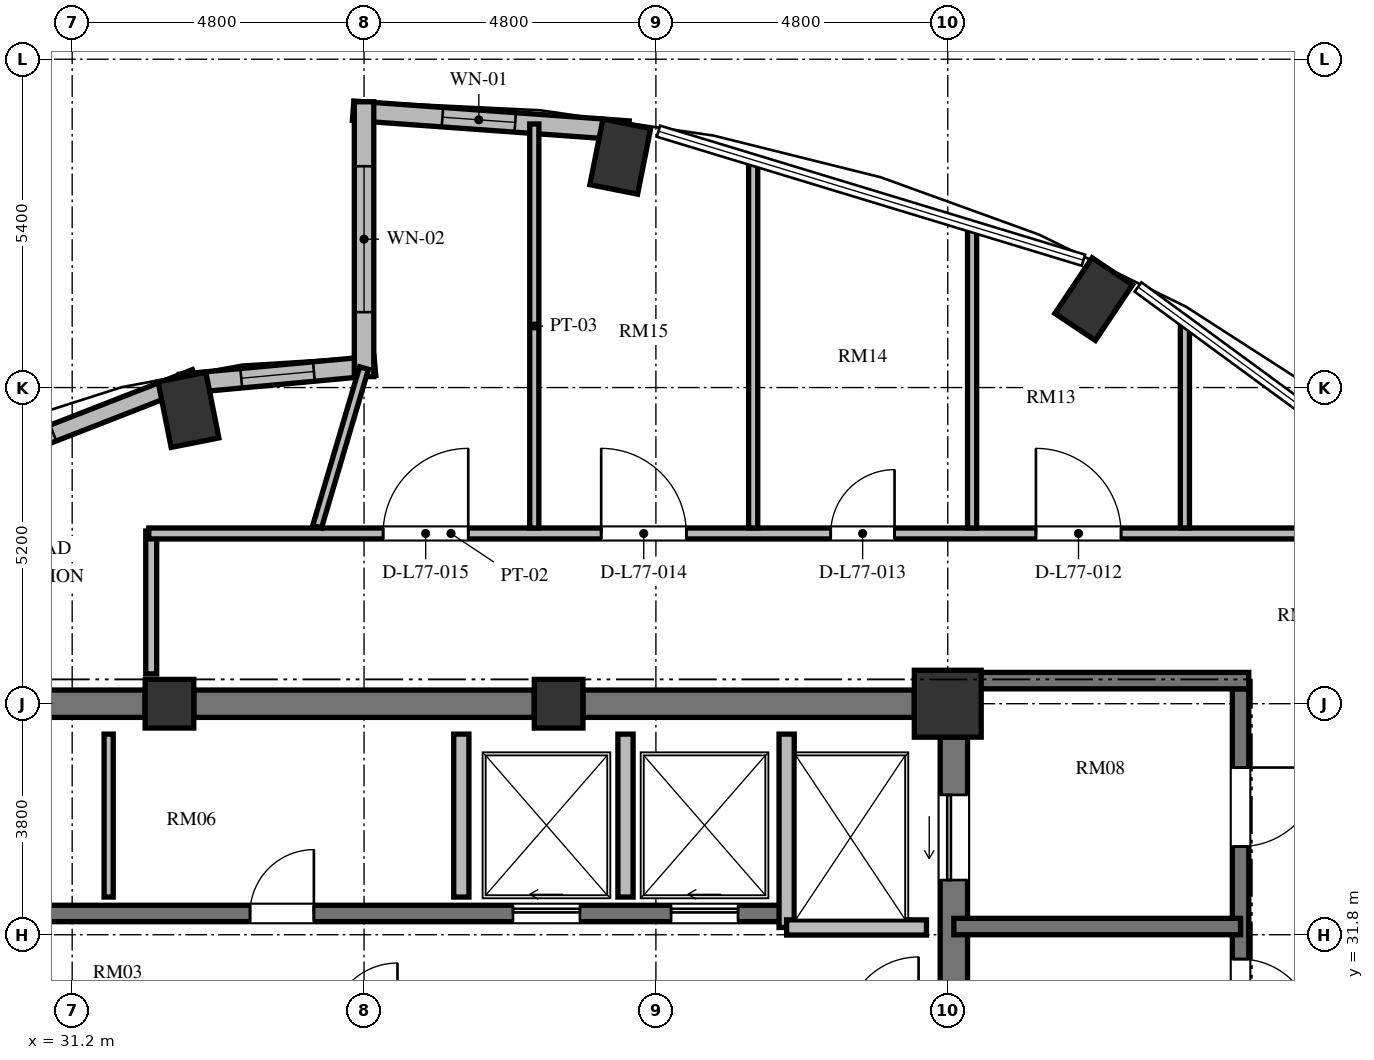
"""IFC4 building model, lengths in metres.
Left out: names, types, materials, properties, quantities, classifications, styles, units other than length and angle.
Written with IfcOpenShell. Run it as: python <this file> out.ifc"""

import sys

from ifc_helpers import new_model, si_unit, direction, frame, frame_2d, origin, origin_2d, place, context, subcontext, project, spatial, rectangle, extrude, element, fill, save


model = new_model("IFC4")
c1 = context("Model", 3, precision=1e-05, world=origin(), true_north=direction((0.0, 1.0)))
c2 = subcontext(c1, "Body", "Model", "MODEL_VIEW")
j1 = project(units=[si_unit("LENGTHUNIT", "METRE"), si_unit("PLANEANGLEUNIT", "RADIAN")], contexts=[c1])
p1 = place(None, origin())
s1 = spatial("IfcSite", under=j1, at=p1, CompositionType="ELEMENT")
p2 = place(p1, origin())
s2 = spatial("IfcBuilding", under=s1, at=p2, CompositionType="ELEMENT")
p3 = place(p2, frame((0.0, 0.0, 295.152)))
s3 = spatial("IfcBuildingStorey", under=s2, at=p3, CompositionType="ELEMENT", Elevation=295.152)
for number, where, z_axis, x_axis in (
    (1, (48.0, 42.254, 0.0), (0.0, 0.0, 1.0), (0.556, 0.831, 0.0)),
    (2, (40.214, 44.598, 0.0), (0.0, 0.0, 1.0), (0.195, 0.981, 0.0)),
    (3, (33.113, 40.433, 0.0), (0.0, 0.0, 1.0), (-0.195, 0.981, 0.0)),
):
    element("IfcColumn", number, at=place(p3, frame(where, z_axis=z_axis, x_axis=x_axis)), inside=s3, PredefinedType="COLUMN", context=c2, shape_type="SweptSolid", body=[
        extrude(rectangle(XDim=1.1, YDim=0.8, at=origin_2d()), origin(), (0.0, 0.0, 1.0), 3.648),
    ])
p4 = place(p3, frame((45.6, 35.6, 0.0), z_axis=(0.0, 0.0, 1.0), x_axis=(1.0, 0.0, 0.0)))
e4 = element("IfcColumn", 4, at=p4, inside=s3, PredefinedType="COLUMN", context=c2, shape_type="SweptSolid", body=[
    extrude(rectangle(XDim=1.1, YDim=1.1, at=origin_2d()), origin(), (0.0, 0.0, 1.0), 3.648),
])
for number, where, z_axis, x_axis in (
    (5, (39.2, 35.6, 0.0), (0.0, 0.0, 1.0), (1.0, 0.0, 0.0)),
    (6, (32.8, 35.6, 0.0), (0.0, 0.0, 1.0), (1.0, 0.0, 0.0)),
):
    element("IfcColumn", number, at=place(p3, frame(where, z_axis=z_axis, x_axis=x_axis)), inside=s3, PredefinedType="COLUMN", context=c2, shape_type="SweptSolid", body=[
        extrude(rectangle(XDim=0.8, YDim=0.8, at=origin_2d()), origin(), (0.0, 0.0, 1.0), 3.648),
    ])
p5 = place(p3, frame((45.7, 20.95, 0.0), z_axis=(0.0, 0.0, 1.0), x_axis=(0.0, 1.0, 0.0)))
e7 = element("IfcWall", 7, at=p5, inside=s3, PredefinedType="SHEAR", context=c2, shape_type="SweptSolid", body=[
    extrude(rectangle(XDim=14.1, YDim=0.45, at=frame_2d((7.05, 0.0))), origin(), (0.0, 0.0, 1.0), 3.648),
])
p6 = place(p5, frame((11.75, 0.0, 0.0)))
e8 = element("IfcOpeningElement", 8, at=p6, cuts=e7, PredefinedType="OPENING", context=c2, shape_type="SweptSolid", body=[
    extrude(rectangle(XDim=1.4, YDim=2.3, at=frame_2d((0.7, 1.15))), frame((0.0, 0.235, 0.0), z_axis=(0.0, -1.0, 0.0), x_axis=(1.0, 0.0, 0.0)), (0.0, 0.0, 1.0), 0.47),
])
p7 = place(p5, frame((0.95, 0.0, 0.0)))
e9 = element("IfcOpeningElement", 9, at=p7, cuts=e7, PredefinedType="OPENING", context=c2, shape_type="SweptSolid", body=[
    extrude(rectangle(XDim=1.4, YDim=2.3, at=frame_2d((0.7, 1.15))), frame((0.0, 0.235, 0.0), z_axis=(0.0, -1.0, 0.0), x_axis=(1.0, 0.0, 0.0)), (0.0, 0.0, 1.0), 0.47),
])
p8 = place(p3, frame((26.95, 35.6, 0.0), z_axis=(0.0, 0.0, 1.0), x_axis=(1.0, 0.0, 0.0)))
e10 = element("IfcWall", 10, at=p8, inside=s3, PredefinedType="SHEAR", context=c2, shape_type="SweptSolid", body=[
    extrude(rectangle(XDim=5.45, YDim=0.45, at=frame_2d((2.725, 0.0))), origin(), (0.0, 0.0, 1.0), 3.648),
])
p9 = place(p3, frame((33.2, 35.6, 0.0), z_axis=(0.0, 0.0, 1.0), x_axis=(1.0, 0.0, 0.0)))
e11 = element("IfcWall", 11, at=p9, inside=s3, PredefinedType="SHEAR", context=c2, shape_type="SweptSolid", body=[
    extrude(rectangle(XDim=5.6, YDim=0.45, at=frame_2d((2.8, 0.0))), origin(), (0.0, 0.0, 1.0), 3.648),
])
p10 = place(p3, frame((39.6, 35.6, 0.0), z_axis=(0.0, 0.0, 1.0), x_axis=(1.0, 0.0, 0.0)))
e12 = element("IfcWall", 12, at=p10, inside=s3, PredefinedType="SHEAR", context=c2, shape_type="SweptSolid", body=[
    extrude(rectangle(XDim=5.45, YDim=0.45, at=frame_2d((2.725, 0.0))), origin(), (0.0, 0.0, 1.0), 3.648),
])
p11 = place(p3, frame((33.228, 40.964, 0.0), z_axis=(0.0, 0.0, 1.0), x_axis=(-0.931716550814, -0.36318627306, 0.0)))
e13 = element("IfcWall", 13, at=p11, inside=s3, PredefinedType="SOLIDWALL", context=c2, shape_type="SweptSolid", body=[
    extrude(rectangle(XDim=6.224, YDim=0.28, at=frame_2d((3.112, 0.0))), origin(), (0.0, 0.0, 1.0), 3.448),
])
p12 = place(p11, frame((2.512, 0.0, 0.85)))
e14 = element("IfcOpeningElement", 14, at=p12, cuts=e13, PredefinedType="OPENING", context=c2, shape_type="SweptSolid", body=[
    extrude(rectangle(XDim=1.2, YDim=1.8, at=frame_2d((0.6, 0.9))), frame((0.0, 0.15, 0.0), z_axis=(0.0, -1.0, 0.0), x_axis=(1.0, 0.0, 0.0)), (0.0, 0.0, 1.0), 0.3),
])
p13 = place(p3, frame((40.35, 45.026, 0.0), z_axis=(0.0, 0.0, 1.0), x_axis=(-0.997412917451, 0.071885131294, 0.0)))
e15 = element("IfcWall", 15, at=p13, inside=s3, PredefinedType="SOLIDWALL", context=c2, shape_type="SweptSolid", body=[
    extrude(rectangle(XDim=4.541, YDim=0.32, at=frame_2d((2.271, 0.0))), origin(), (0.0, 0.0, 1.0), 3.448),
])
p14 = place(p13, frame((1.868, 0.0, 0.85)))
e16 = element("IfcOpeningElement", 16, at=p14, cuts=e15, PredefinedType="OPENING", context=c2, shape_type="SweptSolid", body=[
    extrude(rectangle(XDim=1.2, YDim=2.2, at=frame_2d((0.6, 1.1))), frame((0.0, 0.17, 0.0), z_axis=(0.0, -1.0, 0.0), x_axis=(1.0, 0.0, 0.0)), (0.0, 0.0, 1.0), 0.34),
])
p15 = place(p3, frame((36.179, 41.156, 0.0), z_axis=(0.0, 0.0, 1.0), x_axis=(-0.995736155144, -0.092247001792, 0.0)))
e17 = element("IfcWall", 17, at=p15, inside=s3, PredefinedType="SOLIDWALL", context=c2, shape_type="SweptSolid", body=[
    extrude(rectangle(XDim=3.216, YDim=0.32, at=frame_2d((1.608, 0.0))), origin(), (0.0, 0.0, 1.0), 3.448),
])
p16 = place(p15, frame((1.008, 0.0, 0.85)))
e18 = element("IfcOpeningElement", 18, at=p16, cuts=e17, PredefinedType="OPENING", context=c2, shape_type="SweptSolid", body=[
    extrude(rectangle(XDim=1.2, YDim=1.8, at=frame_2d((0.6, 0.9))), frame((0.0, 0.17, 0.0), z_axis=(0.0, -1.0, 0.0), x_axis=(1.0, 0.0, 0.0)), (0.0, 0.0, 1.0), 0.34),
])
p17 = place(p3, frame((36.0, 45.5, 0.0), z_axis=(0.0, 0.0, 1.0), x_axis=(0.0, -1.0, 0.0)))
e19 = element("IfcWall", 19, at=p17, inside=s3, PredefinedType="SOLIDWALL", context=c2, shape_type="SweptSolid", body=[
    extrude(rectangle(XDim=4.52, YDim=0.32, at=frame_2d((2.26, 0.0))), origin(), (0.0, 0.0, 1.0), 3.448),
])
p18 = place(p17, frame((1.06, 0.0, 0.84)))
e20 = element("IfcOpeningElement", 20, at=p18, cuts=e19, PredefinedType="OPENING", context=c2, shape_type="SweptSolid", body=[
    extrude(rectangle(XDim=2.4, YDim=2.04, at=frame_2d((1.2, 1.02))), frame((0.0, 0.17, 0.0), z_axis=(0.0, -1.0, 0.0), x_axis=(1.0, 0.0, 0.0)), (0.0, 0.0, 1.0), 0.34),
])
p19 = place(p3, frame((26.55, 32.15, 0.0), z_axis=(0.0, 0.0, 1.0), x_axis=(1.0, 0.0, 0.0)))
e21 = element("IfcWall", 21, at=p19, inside=s3, PredefinedType="SHEAR", context=c2, shape_type="SweptSolid", body=[
    extrude(rectangle(XDim=16.4, YDim=0.27, at=frame_2d((8.2, 0.0))), origin(), (0.0, 0.0, 1.0), 3.648),
])
p20 = place(p19, frame((2.175, 0.0, 0.0)))
e22 = element("IfcOpeningElement", 22, at=p20, cuts=e21, PredefinedType="OPENING", context=c2, shape_type="SweptSolid", body=[
    extrude(rectangle(XDim=1.05, YDim=2.15, at=frame_2d((0.525, 1.075))), frame((0.0, 0.145, 0.0), z_axis=(0.0, -1.0, 0.0), x_axis=(1.0, 0.0, 0.0)), (0.0, 0.0, 1.0), 0.29),
])
p21 = place(p19, frame((7.575, 0.0, 0.0)))
e23 = element("IfcOpeningElement", 23, at=p21, cuts=e21, PredefinedType="OPENING", context=c2, shape_type="SweptSolid", body=[
    extrude(rectangle(XDim=1.05, YDim=2.15, at=frame_2d((0.525, 1.075))), frame((0.0, 0.145, 0.0), z_axis=(0.0, -1.0, 0.0), x_axis=(1.0, 0.0, 0.0)), (0.0, 0.0, 1.0), 0.29),
])
p22 = place(p19, frame((11.9, 0.0, 0.0)))
e24 = element("IfcOpeningElement", 24, at=p22, cuts=e21, PredefinedType="OPENING", context=c2, shape_type="SweptSolid", body=[
    extrude(rectangle(XDim=1.1, YDim=2.2, at=frame_2d((0.55, 1.1))), frame((0.0, 0.145, 0.0), z_axis=(0.0, -1.0, 0.0), x_axis=(1.0, 0.0, 0.0)), (0.0, 0.0, 1.0), 0.29),
])
p23 = place(p19, frame((14.5, 0.0, 0.0)))
e25 = element("IfcOpeningElement", 25, at=p23, cuts=e21, PredefinedType="OPENING", context=c2, shape_type="SweptSolid", body=[
    extrude(rectangle(XDim=1.1, YDim=2.2, at=frame_2d((0.55, 1.1))), frame((0.0, 0.145, 0.0), z_axis=(0.0, -1.0, 0.0), x_axis=(1.0, 0.0, 0.0)), (0.0, 0.0, 1.0), 0.29),
])
p24 = place(p3, frame((42.95, 31.92, 0.0), z_axis=(0.0, 0.0, 1.0), x_axis=(0.0, 1.0, 0.0)))
e26 = element("IfcWall", 26, at=p24, inside=s3, PredefinedType="SOLIDWALL", context=c2, shape_type="SweptSolid", body=[
    extrude(rectangle(XDim=3.18, YDim=0.25, at=frame_2d((1.59, 0.0))), origin(), (0.0, 0.0, 1.0), 3.448),
])
p25 = place(p3, frame((42.95, 31.92, 0.0), z_axis=(0.0, 0.0, 1.0), x_axis=(1.0, 0.0, 0.0)))
e27 = element("IfcWall", 27, at=p25, inside=s3, PredefinedType="SOLIDWALL", context=c2, shape_type="SweptSolid", body=[
    extrude(rectangle(XDim=2.3, YDim=0.25, at=frame_2d((1.15, 0.0))), origin(), (0.0, 0.0, 1.0), 3.448),
])
for number, where, z_axis, x_axis in (
    (28, (37.6, 32.42, 0.0), (0.0, 0.0, 1.0), (0.0, 1.0, 0.0)),
    (29, (40.3, 32.42, 0.0), (0.0, 0.0, 1.0), (0.0, 1.0, 0.0)),
):
    element("IfcWall", number, at=place(p3, frame(where, z_axis=z_axis, x_axis=x_axis)), inside=s3, PredefinedType="SOLIDWALL", context=c2, shape_type="SweptSolid", body=[
        extrude(rectangle(XDim=2.68, YDim=0.25, at=frame_2d((1.34, 0.0))), origin(), (0.0, 0.0, 1.0), 3.448),
    ])
p26 = place(p3, frame((31.8, 32.42, 0.0), z_axis=(0.0, 0.0, 1.0), x_axis=(0.0, 1.0, 0.0)))
e30 = element("IfcWall", 30, at=p26, inside=s3, PredefinedType="PARTITIONING", context=c2, shape_type="SweptSolid", body=[
    extrude(rectangle(XDim=2.68, YDim=0.15, at=frame_2d((1.34, 0.0))), origin(), (0.0, 0.0, 1.0), 3.448),
])
p27 = place(p3, frame((50.415, 35.845, 0.0), z_axis=(0.0, 0.0, 1.0), x_axis=(0.0, -1.0, 0.0)))
e31 = element("IfcWall", 31, at=p27, inside=s3, PredefinedType="SHEAR", context=c2, shape_type="SweptSolid", body=[
    extrude(rectangle(XDim=15.825, YDim=0.27, at=frame_2d((7.913, 0.0))), origin(), (0.0, 0.0, 1.0), 3.648),
])
p28 = place(p27, frame((4.445, 0.0, 0.0)))
e32 = element("IfcOpeningElement", 32, at=p28, cuts=e31, PredefinedType="OPENING", context=c2, shape_type="SweptSolid", body=[
    extrude(rectangle(XDim=1.2, YDim=2.15, at=frame_2d((0.6, 1.075))), frame((0.0, 0.145, 0.0), z_axis=(0.0, -1.0, 0.0), x_axis=(1.0, 0.0, 0.0)), (0.0, 0.0, 1.0), 0.29),
])
p29 = place(p27, frame((1.295, 0.0, 0.0)))
e33 = element("IfcOpeningElement", 33, at=p29, cuts=e31, PredefinedType="OPENING", context=c2, shape_type="SweptSolid", body=[
    extrude(rectangle(XDim=1.3, YDim=2.2, at=frame_2d((0.65, 1.1))), frame((0.0, 0.145, 0.0), z_axis=(0.0, -1.0, 0.0), x_axis=(1.0, 0.0, 0.0)), (0.0, 0.0, 1.0), 0.29),
])
p30 = place(p27, frame((13.095, 0.0, 0.0)))
e34 = element("IfcOpeningElement", 34, at=p30, cuts=e31, PredefinedType="OPENING", context=c2, shape_type="SweptSolid", body=[
    extrude(rectangle(XDim=1.3, YDim=2.2, at=frame_2d((0.65, 1.1))), frame((0.0, 0.145, 0.0), z_axis=(0.0, -1.0, 0.0), x_axis=(1.0, 0.0, 0.0)), (0.0, 0.0, 1.0), 0.29),
])
p31 = place(p3, frame((45.925, 35.98, 0.0), z_axis=(0.0, 0.0, 1.0), x_axis=(1.0, 0.0, 0.0)))
e35 = element("IfcWall", 35, at=p31, inside=s3, PredefinedType="SHEAR", context=c2, shape_type="SweptSolid", body=[
    extrude(rectangle(XDim=4.625, YDim=0.27, at=frame_2d((2.312, 0.0))), origin(), (0.0, 0.0, 1.0), 3.648),
])
p32 = place(p3, frame((45.7, 31.935, 0.0), z_axis=(0.0, 0.0, 1.0), x_axis=(1.0, 0.0, 0.0)))
e36 = element("IfcWall", 36, at=p32, inside=s3, PredefinedType="SHEAR", context=c2, shape_type="SweptSolid", body=[
    extrude(rectangle(XDim=4.715, YDim=0.27, at=frame_2d((2.357, 0.0))), origin(), (0.0, 0.0, 1.0), 3.648),
])
p33 = place(p3, frame((32.5, 36.09, 0.0), z_axis=(0.0, 0.0, 1.0), x_axis=(0.0, 1.0, 0.0)))
e37 = element("IfcWall", 37, at=p33, inside=s3, PredefinedType="PARTITIONING", context=c2, shape_type="SweptSolid", body=[
    extrude(rectangle(XDim=2.35, YDim=0.18, at=frame_2d((1.175, 0.0))), origin(), (0.0, 0.0, 1.0), 3.448),
])
p34 = place(p3, frame((32.46, 38.4, 0.0), z_axis=(0.0, 0.0, 1.0), x_axis=(1.0, 0.0, 0.0)))
e38 = element("IfcWall", 38, at=p34, inside=s3, PredefinedType="PARTITIONING", context=c2, shape_type="SweptSolid", body=[
    extrude(rectangle(XDim=19.879, YDim=0.18, at=frame_2d((9.939, 0.0))), origin(), (0.0, 0.0, 1.0), 3.073),
])
p35 = place(p34, frame((14.59, 0.0, 0.0)))
e39 = element("IfcOpeningElement", 39, at=p35, cuts=e38, PredefinedType="OPENING", context=c2, shape_type="SweptSolid", body=[
    extrude(rectangle(XDim=1.4, YDim=2.2, at=frame_2d((0.7, 1.1))), frame((0.0, 0.1, 0.0), z_axis=(0.0, -1.0, 0.0), x_axis=(1.0, 0.0, 0.0)), (0.0, 0.0, 1.0), 0.2),
])
p36 = place(p34, frame((11.215, 0.0, 0.0)))
e40 = element("IfcOpeningElement", 40, at=p36, cuts=e38, PredefinedType="OPENING", context=c2, shape_type="SweptSolid", body=[
    extrude(rectangle(XDim=1.05, YDim=2.15, at=frame_2d((0.525, 1.075))), frame((0.0, 0.1, 0.0), z_axis=(0.0, -1.0, 0.0), x_axis=(1.0, 0.0, 0.0)), (0.0, 0.0, 1.0), 0.2),
])
p37 = place(p34, frame((7.44, 0.0, 0.0)))
e41 = element("IfcOpeningElement", 41, at=p37, cuts=e38, PredefinedType="OPENING", context=c2, shape_type="SweptSolid", body=[
    extrude(rectangle(XDim=1.4, YDim=2.2, at=frame_2d((0.7, 1.1))), frame((0.0, 0.1, 0.0), z_axis=(0.0, -1.0, 0.0), x_axis=(1.0, 0.0, 0.0)), (0.0, 0.0, 1.0), 0.2),
])
p38 = place(p34, frame((3.854, 0.0, 0.0)))
e42 = element("IfcOpeningElement", 42, at=p38, cuts=e38, PredefinedType="OPENING", context=c2, shape_type="SweptSolid", body=[
    extrude(rectangle(XDim=1.4, YDim=2.2, at=frame_2d((0.7, 1.1))), frame((0.0, 0.1, 0.0), z_axis=(0.0, -1.0, 0.0), x_axis=(1.0, 0.0, 0.0)), (0.0, 0.0, 1.0), 0.2),
])
p39 = place(p3, frame((35.229, 38.511, 0.0), z_axis=(0.0, 0.0, 1.0), x_axis=(0.28355057677, 0.958957282893, 0.0)))
e43 = element("IfcWall", 43, at=p39, inside=s3, PredefinedType="PARTITIONING", context=c2, shape_type="SweptSolid", body=[
    extrude(rectangle(XDim=2.721, YDim=0.15, at=frame_2d((1.36, 0.0))), origin(), (0.0, 0.0, 1.0), 3.448),
])
p40 = place(p3, frame((38.8, 38.49, 0.0), z_axis=(0.0, 0.0, 1.0), x_axis=(0.0, 1.0, 0.0)))
e44 = element("IfcWall", 44, at=p40, inside=s3, PredefinedType="PARTITIONING", context=c2, shape_type="SweptSolid", body=[
    extrude(rectangle(XDim=6.645, YDim=0.15, at=frame_2d((3.322, 0.0))), origin(), (0.0, 0.0, 1.0), 3.448),
])
p41 = place(p3, frame((42.4, 38.49, 0.0), z_axis=(0.0, 0.0, 1.0), x_axis=(0.0, 1.0, 0.0)))
e45 = element("IfcWall", 45, at=p41, inside=s3, PredefinedType="PARTITIONING", context=c2, shape_type="SweptSolid", body=[
    extrude(rectangle(XDim=6.036, YDim=0.15, at=frame_2d((3.018, 0.0))), origin(), (0.0, 0.0, 1.0), 3.448),
])
p42 = place(p3, frame((46.0, 38.49, 0.0), z_axis=(0.0, 0.0, 1.0), x_axis=(0.0, 1.0, 0.0)))
e46 = element("IfcWall", 46, at=p42, inside=s3, PredefinedType="PARTITIONING", context=c2, shape_type="SweptSolid", body=[
    extrude(rectangle(XDim=4.943, YDim=0.15, at=frame_2d((2.472, 0.0))), origin(), (0.0, 0.0, 1.0), 3.448),
])
p43 = place(p3, frame((49.5, 38.49, 0.0), z_axis=(0.0, 0.0, 1.0), x_axis=(0.0, 1.0, 0.0)))
e47 = element("IfcWall", 47, at=p43, inside=s3, PredefinedType="PARTITIONING", context=c2, shape_type="SweptSolid", body=[
    extrude(rectangle(XDim=3.387, YDim=0.15, at=frame_2d((1.694, 0.0))), origin(), (0.0, 0.0, 1.0), 3.448),
])
p44 = place(p12, origin())
e48 = element("IfcWindow", 48, at=p44, inside=s3, PartitioningType="SINGLE_PANEL", PredefinedType="WINDOW", context=c2, shape_type="SweptSolid", body=[
    extrude(rectangle(XDim=1.2, YDim=1.8, at=frame_2d((0.6, 0.9))), frame((0.0, 0.03, 0.0), z_axis=(0.0, -1.0, 0.0), x_axis=(1.0, 0.0, 0.0)), (0.0, 0.0, 1.0), 0.06),
])
fill(e14, e48)
p45 = place(p14, origin())
e49 = element("IfcWindow", 49, at=p45, inside=s3, PartitioningType="SINGLE_PANEL", PredefinedType="WINDOW", context=c2, shape_type="SweptSolid", body=[
    extrude(rectangle(XDim=1.2, YDim=2.2, at=frame_2d((0.6, 1.1))), frame((0.0, 0.03, 0.0), z_axis=(0.0, -1.0, 0.0), x_axis=(1.0, 0.0, 0.0)), (0.0, 0.0, 1.0), 0.06),
])
fill(e16, e49)
p46 = place(p16, origin())
e50 = element("IfcWindow", 50, at=p46, inside=s3, PartitioningType="SINGLE_PANEL", PredefinedType="WINDOW", context=c2, shape_type="SweptSolid", body=[
    extrude(rectangle(XDim=1.2, YDim=1.8, at=frame_2d((0.6, 0.9))), frame((0.0, 0.03, 0.0), z_axis=(0.0, -1.0, 0.0), x_axis=(1.0, 0.0, 0.0)), (0.0, 0.0, 1.0), 0.06),
])
fill(e18, e50)
p47 = place(p18, origin())
e51 = element("IfcWindow", 51, at=p47, inside=s3, PartitioningType="SINGLE_PANEL", PredefinedType="WINDOW", context=c2, shape_type="SweptSolid", body=[
    extrude(rectangle(XDim=2.4, YDim=2.04, at=frame_2d((1.2, 1.02))), frame((0.0, 0.03, 0.0), z_axis=(0.0, -1.0, 0.0), x_axis=(1.0, 0.0, 0.0)), (0.0, 0.0, 1.0), 0.06),
])
fill(e20, e51)
p48 = place(p21, origin())
e52 = element("IfcDoor", 52, at=p48, inside=s3, OperationType="SINGLE_SWING_RIGHT", PredefinedType="DOOR", context=c2, shape_type="SweptSolid", body=[
    extrude(rectangle(XDim=1.05, YDim=2.15, at=frame_2d((0.525, 1.075))), frame((0.0, 0.025, 0.0), z_axis=(0.0, -1.0, 0.0), x_axis=(1.0, 0.0, 0.0)), (0.0, 0.0, 1.0), 0.05),
])
fill(e23, e52)
p49 = place(p22, origin())
e53 = element("IfcDoor", 53, at=p49, inside=s3, OperationType="SLIDING_TO_LEFT", PredefinedType="DOOR", context=c2, shape_type="SweptSolid", body=[
    extrude(rectangle(XDim=1.1, YDim=2.2, at=frame_2d((0.55, 1.1))), frame((0.0, 0.025, 0.0), z_axis=(0.0, -1.0, 0.0), x_axis=(1.0, 0.0, 0.0)), (0.0, 0.0, 1.0), 0.05),
])
fill(e24, e53)
p50 = place(p23, origin())
e54 = element("IfcDoor", 54, at=p50, inside=s3, OperationType="SLIDING_TO_LEFT", PredefinedType="DOOR", context=c2, shape_type="SweptSolid", body=[
    extrude(rectangle(XDim=1.1, YDim=2.2, at=frame_2d((0.55, 1.1))), frame((0.0, 0.025, 0.0), z_axis=(0.0, -1.0, 0.0), x_axis=(1.0, 0.0, 0.0)), (0.0, 0.0, 1.0), 0.05),
])
fill(e25, e54)
p51 = place(p6, origin())
e55 = element("IfcDoor", 55, at=p51, inside=s3, OperationType="SLIDING_TO_LEFT", PredefinedType="DOOR", context=c2, shape_type="SweptSolid", body=[
    extrude(rectangle(XDim=1.4, YDim=2.3, at=frame_2d((0.7, 1.15))), frame((0.0, 0.025, 0.0), z_axis=(0.0, -1.0, 0.0), x_axis=(1.0, 0.0, 0.0)), (0.0, 0.0, 1.0), 0.05),
])
fill(e8, e55)
p52 = place(p28, origin())
e56 = element("IfcDoor", 56, at=p52, inside=s3, OperationType="SINGLE_SWING_RIGHT", PredefinedType="DOOR", context=c2, shape_type="SweptSolid", body=[
    extrude(rectangle(XDim=1.2, YDim=2.15, at=frame_2d((0.6, 1.075))), frame((0.0, 0.025, 0.0), z_axis=(0.0, -1.0, 0.0), x_axis=(1.0, 0.0, 0.0)), (0.0, 0.0, 1.0), 0.05),
])
fill(e32, e56)
p53 = place(p29, origin())
e57 = element("IfcDoor", 57, at=p53, inside=s3, OperationType="SINGLE_SWING_LEFT", PredefinedType="DOOR", context=c2, shape_type="SweptSolid", body=[
    extrude(rectangle(XDim=1.3, YDim=2.2, at=frame_2d((0.65, 1.1))), frame((0.0, 0.025, 0.0), z_axis=(0.0, -1.0, 0.0), x_axis=(1.0, 0.0, 0.0)), (0.0, 0.0, 1.0), 0.05),
])
fill(e33, e57)
p54 = place(p35, origin())
e58 = element("IfcDoor", 58, at=p54, inside=s3, OperationType="SINGLE_SWING_LEFT", PredefinedType="DOOR", context=c2, shape_type="SweptSolid", body=[
    extrude(rectangle(XDim=1.4, YDim=2.2, at=frame_2d((0.7, 1.1))), frame((0.0, 0.025, 0.0), z_axis=(0.0, -1.0, 0.0), x_axis=(1.0, 0.0, 0.0)), (0.0, 0.0, 1.0), 0.05),
])
fill(e39, e58)
p55 = place(p36, origin())
e59 = element("IfcDoor", 59, at=p55, inside=s3, OperationType="SINGLE_SWING_RIGHT", PredefinedType="DOOR", context=c2, shape_type="SweptSolid", body=[
    extrude(rectangle(XDim=1.05, YDim=2.15, at=frame_2d((0.525, 1.075))), frame((0.0, 0.025, 0.0), z_axis=(0.0, -1.0, 0.0), x_axis=(1.0, 0.0, 0.0)), (0.0, 0.0, 1.0), 0.05),
])
fill(e40, e59)
p56 = place(p37, origin())
e60 = element("IfcDoor", 60, at=p56, inside=s3, OperationType="SINGLE_SWING_LEFT", PredefinedType="DOOR", context=c2, shape_type="SweptSolid", body=[
    extrude(rectangle(XDim=1.4, YDim=2.2, at=frame_2d((0.7, 1.1))), frame((0.0, 0.025, 0.0), z_axis=(0.0, -1.0, 0.0), x_axis=(1.0, 0.0, 0.0)), (0.0, 0.0, 1.0), 0.05),
])
fill(e41, e60)
p57 = place(p38, origin())
e61 = element("IfcDoor", 61, at=p57, inside=s3, OperationType="SINGLE_SWING_RIGHT", PredefinedType="DOOR", context=c2, shape_type="SweptSolid", body=[
    extrude(rectangle(XDim=1.4, YDim=2.2, at=frame_2d((0.7, 1.1))), frame((0.0, 0.025, 0.0), z_axis=(0.0, -1.0, 0.0), x_axis=(1.0, 0.0, 0.0)), (0.0, 0.0, 1.0), 0.05),
])
fill(e42, e61)
save(model, sys.argv[1])
